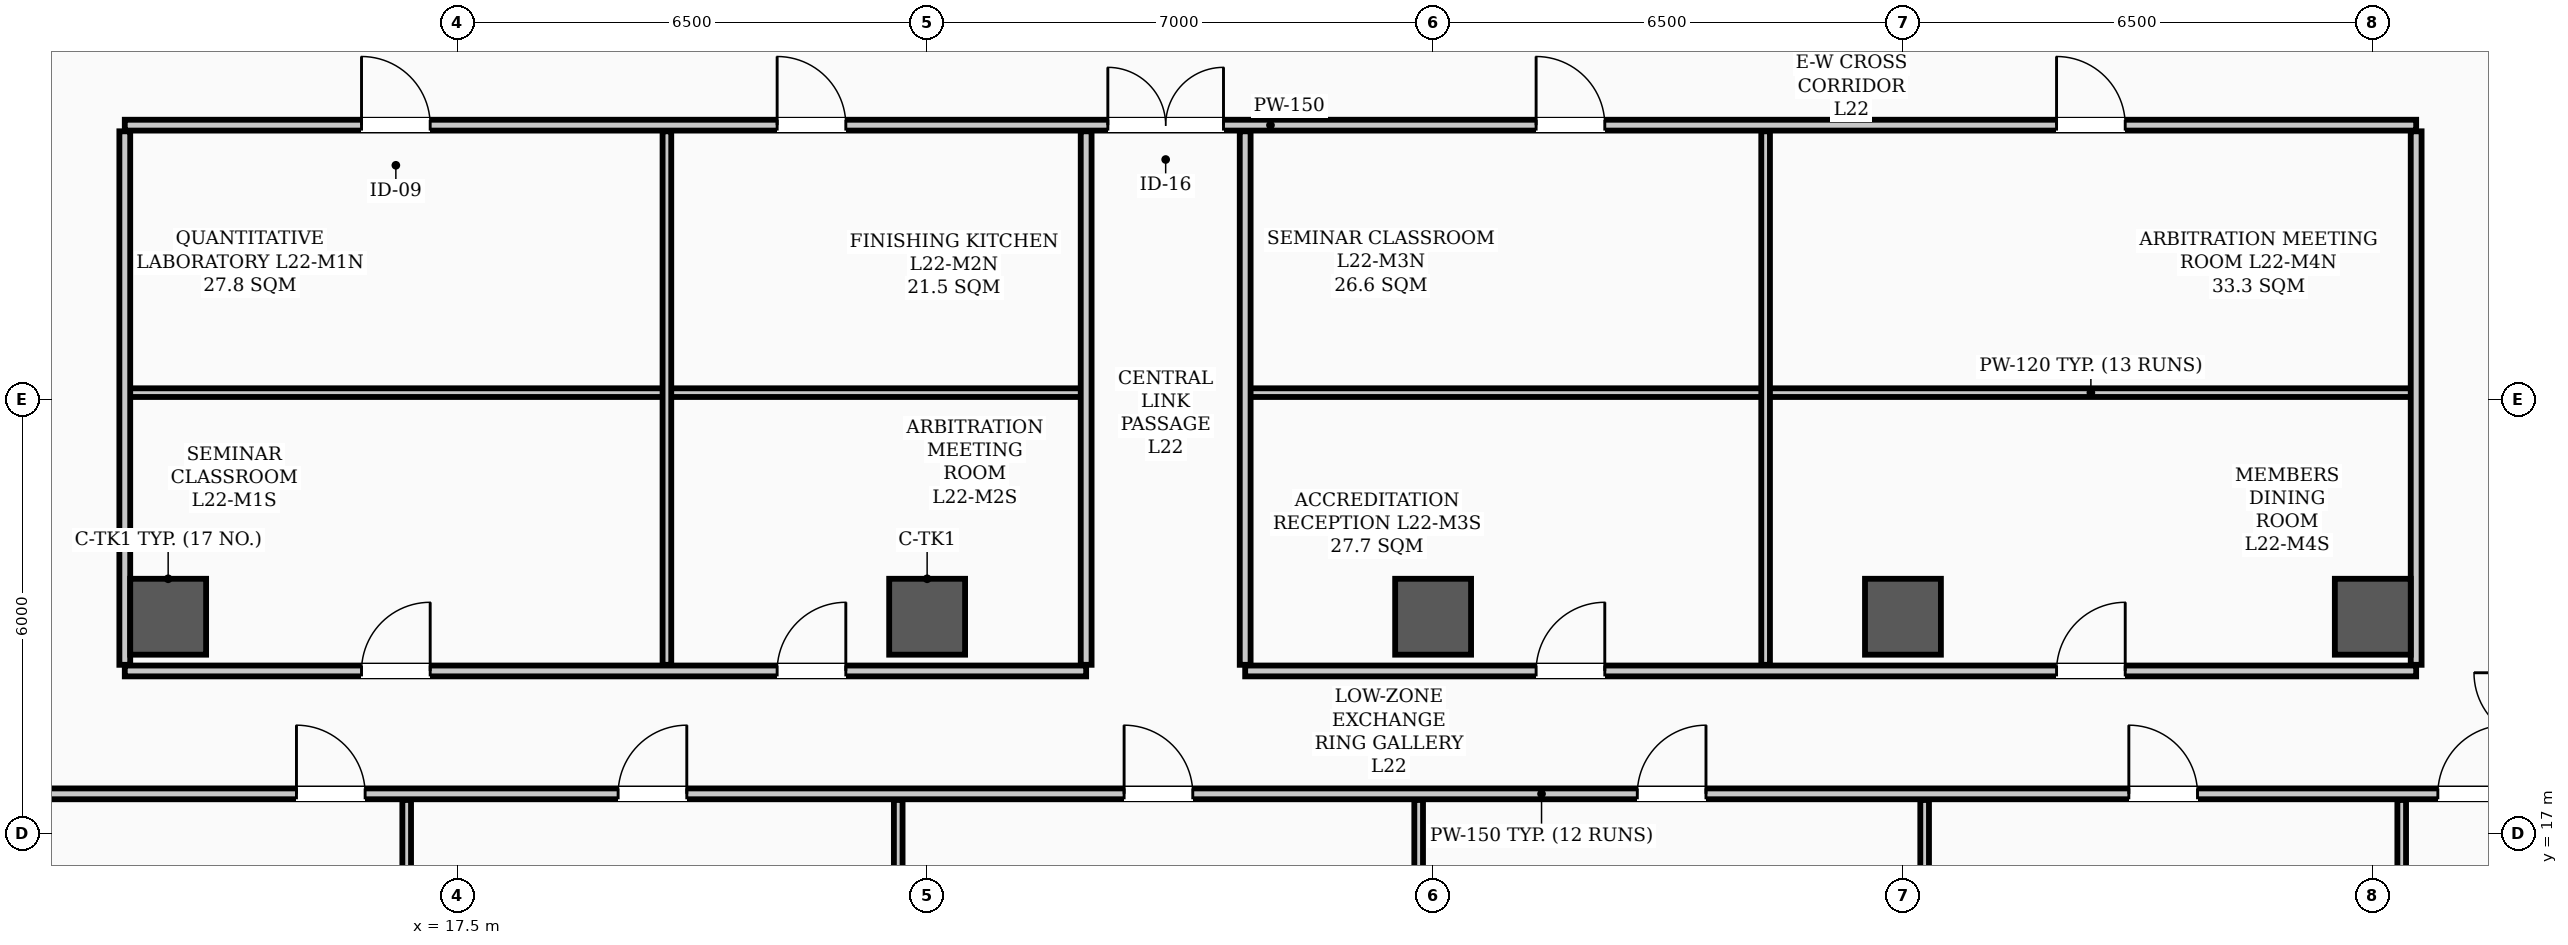
"""IFC4 building model, lengths in metres.
Left out: names, types, materials, properties, quantities, classifications, styles, units other than length and angle.
Written with IfcOpenShell. Run it as: python <this file> out.ifc"""

import sys

from ifc_helpers import new_model, si_unit, direction, frame, frame_2d, origin, origin_2d, place, context, subcontext, project, spatial, rectangle, hollow_rectangle, extrude, element, fill, save


model = new_model("IFC4")
c1 = context("Model", 3, precision=1e-05, world=origin(), true_north=direction((0.0, 1.0)))
c2 = subcontext(c1, "Body", "Model", "MODEL_VIEW")
j1 = project(units=[si_unit("LENGTHUNIT", "METRE"), si_unit("PLANEANGLEUNIT", "RADIAN")], contexts=[c1])
p1 = place(None, origin())
s1 = spatial("IfcSite", under=j1, at=p1, CompositionType="ELEMENT")
p2 = place(p1, origin())
s2 = spatial("IfcBuilding", under=s1, at=p2, CompositionType="ELEMENT")
p3 = place(p2, frame((0.0, 0.0, 88.9)))
s3 = spatial("IfcBuildingStorey", under=s2, at=p3, CompositionType="ELEMENT", Elevation=88.9)
for number, where, z_axis, x_axis in (
    (1, (13.5, 20.0, 0.0), (0.0, 0.0, 1.0), (1.0, 0.0, 0.0)),
    (2, (24.0, 20.0, 0.0), (0.0, 0.0, 1.0), (1.0, 0.0, 0.0)),
    (3, (31.0, 20.0, 0.0), (0.0, 0.0, 1.0), (1.0, 0.0, 0.0)),
    (4, (37.5, 20.0, 0.0), (0.0, 0.0, 1.0), (1.0, 0.0, 0.0)),
    (5, (44.0, 20.0, 0.0), (0.0, 0.0, 1.0), (1.0, 0.0, 0.0)),
):
    element("IfcColumn", number, at=place(p3, frame(where, z_axis=z_axis, x_axis=x_axis)), inside=s3, PredefinedType="COLUMN", context=c2, shape_type="SweptSolid", body=[
        extrude(hollow_rectangle(XDim=1.05, YDim=1.05, WallThickness=0.038, InnerFilletRadius=0.019, OuterFilletRadius=0.057, at=origin_2d()), origin(), (0.0, 0.0, 1.0), 3.9),
    ])
p4 = place(p3, frame((12.9, 26.8, 0.0), z_axis=(0.0, 0.0, 1.0), x_axis=(1.0, 0.0, 0.0)))
e6 = element("IfcWall", 6, at=p4, inside=s3, PredefinedType="PARTITIONING", context=c2, shape_type="SweptSolid", body=[
    extrude(rectangle(XDim=31.7, YDim=0.15, at=frame_2d((15.85, 0.0))), origin(), (0.0, 0.0, 1.0), 3.1),
])
p5 = place(p4, frame((13.6, 0.0, 0.0)))
e7 = element("IfcOpeningElement", 7, at=p5, cuts=e6, PredefinedType="OPENING", context=c2, shape_type="SweptSolid", body=[
    extrude(rectangle(XDim=1.6, YDim=2.08, at=frame_2d((0.8, 1.04))), frame((0.0, 0.085, 0.0), z_axis=(0.0, -1.0, 0.0), x_axis=(1.0, 0.0, 0.0)), (0.0, 0.0, 1.0), 0.17),
])
p6 = place(p4, frame((3.275, 0.0, 0.0)))
e8 = element("IfcOpeningElement", 8, at=p6, cuts=e6, PredefinedType="OPENING", context=c2, shape_type="SweptSolid", body=[
    extrude(rectangle(XDim=0.95, YDim=2.08, at=frame_2d((0.475, 1.04))), frame((0.0, 0.085, 0.0), z_axis=(0.0, -1.0, 0.0), x_axis=(1.0, 0.0, 0.0)), (0.0, 0.0, 1.0), 0.17),
])
p7 = place(p4, frame((9.025, 0.0, 0.0)))
e9 = element("IfcOpeningElement", 9, at=p7, cuts=e6, PredefinedType="OPENING", context=c2, shape_type="SweptSolid", body=[
    extrude(rectangle(XDim=0.95, YDim=2.08, at=frame_2d((0.475, 1.04))), frame((0.0, 0.085, 0.0), z_axis=(0.0, -1.0, 0.0), x_axis=(1.0, 0.0, 0.0)), (0.0, 0.0, 1.0), 0.17),
])
p8 = place(p4, frame((19.525, 0.0, 0.0)))
e10 = element("IfcOpeningElement", 10, at=p8, cuts=e6, PredefinedType="OPENING", context=c2, shape_type="SweptSolid", body=[
    extrude(rectangle(XDim=0.95, YDim=2.08, at=frame_2d((0.475, 1.04))), frame((0.0, 0.085, 0.0), z_axis=(0.0, -1.0, 0.0), x_axis=(1.0, 0.0, 0.0)), (0.0, 0.0, 1.0), 0.17),
])
p9 = place(p4, frame((26.725, 0.0, 0.0)))
e11 = element("IfcOpeningElement", 11, at=p9, cuts=e6, PredefinedType="OPENING", context=c2, shape_type="SweptSolid", body=[
    extrude(rectangle(XDim=0.95, YDim=2.08, at=frame_2d((0.475, 1.04))), frame((0.0, 0.085, 0.0), z_axis=(0.0, -1.0, 0.0), x_axis=(1.0, 0.0, 0.0)), (0.0, 0.0, 1.0), 0.17),
])
p10 = place(p3, frame((7.81, 17.55, 0.0), z_axis=(0.0, 0.0, 1.0), x_axis=(1.0, 0.0, 0.0)))
e12 = element("IfcWall", 12, at=p10, inside=s3, PredefinedType="PARTITIONING", context=c2, shape_type="SweptSolid", body=[
    extrude(rectangle(XDim=49.38, YDim=0.15, at=frame_2d((24.69, 0.0))), origin(), (0.0, 0.0, 1.0), 3.1),
])
p11 = place(p10, frame((7.465, 0.0, 0.0)))
e13 = element("IfcOpeningElement", 13, at=p11, cuts=e12, PredefinedType="OPENING", context=c2, shape_type="SweptSolid", body=[
    extrude(rectangle(XDim=0.95, YDim=2.08, at=frame_2d((0.475, 1.04))), frame((0.0, 0.085, 0.0), z_axis=(0.0, -1.0, 0.0), x_axis=(1.0, 0.0, 0.0)), (0.0, 0.0, 1.0), 0.17),
])
p12 = place(p10, frame((11.915, 0.0, 0.0)))
e14 = element("IfcOpeningElement", 14, at=p12, cuts=e12, PredefinedType="OPENING", context=c2, shape_type="SweptSolid", body=[
    extrude(rectangle(XDim=0.95, YDim=2.08, at=frame_2d((0.475, 1.04))), frame((0.0, 0.085, 0.0), z_axis=(0.0, -1.0, 0.0), x_axis=(1.0, 0.0, 0.0)), (0.0, 0.0, 1.0), 0.17),
])
p13 = place(p10, frame((18.915, 0.0, 0.0)))
e15 = element("IfcOpeningElement", 15, at=p13, cuts=e12, PredefinedType="OPENING", context=c2, shape_type="SweptSolid", body=[
    extrude(rectangle(XDim=0.95, YDim=2.08, at=frame_2d((0.475, 1.04))), frame((0.0, 0.085, 0.0), z_axis=(0.0, -1.0, 0.0), x_axis=(1.0, 0.0, 0.0)), (0.0, 0.0, 1.0), 0.17),
])
p14 = place(p10, frame((26.015, 0.0, 0.0)))
e16 = element("IfcOpeningElement", 16, at=p14, cuts=e12, PredefinedType="OPENING", context=c2, shape_type="SweptSolid", body=[
    extrude(rectangle(XDim=0.95, YDim=2.08, at=frame_2d((0.475, 1.04))), frame((0.0, 0.085, 0.0), z_axis=(0.0, -1.0, 0.0), x_axis=(1.0, 0.0, 0.0)), (0.0, 0.0, 1.0), 0.17),
])
p15 = place(p10, frame((32.815, 0.0, 0.0)))
e17 = element("IfcOpeningElement", 17, at=p15, cuts=e12, PredefinedType="OPENING", context=c2, shape_type="SweptSolid", body=[
    extrude(rectangle(XDim=0.95, YDim=2.08, at=frame_2d((0.475, 1.04))), frame((0.0, 0.085, 0.0), z_axis=(0.0, -1.0, 0.0), x_axis=(1.0, 0.0, 0.0)), (0.0, 0.0, 1.0), 0.17),
])
p16 = place(p10, frame((37.09, 0.0, 0.0)))
e18 = element("IfcOpeningElement", 18, at=p16, cuts=e12, PredefinedType="OPENING", context=c2, shape_type="SweptSolid", body=[
    extrude(rectangle(XDim=0.95, YDim=2.08, at=frame_2d((0.475, 1.04))), frame((0.0, 0.085, 0.0), z_axis=(0.0, -1.0, 0.0), x_axis=(1.0, 0.0, 0.0)), (0.0, 0.0, 1.0), 0.17),
])
p17 = place(p3, frame((12.9, 19.25, 0.0), z_axis=(0.0, 0.0, 1.0), x_axis=(1.0, 0.0, 0.0)))
e19 = element("IfcWall", 19, at=p17, inside=s3, PredefinedType="PARTITIONING", context=c2, shape_type="SweptSolid", body=[
    extrude(rectangle(XDim=13.3, YDim=0.15, at=frame_2d((6.65, 0.0))), origin(), (0.0, 0.0, 1.0), 3.1),
])
p18 = place(p17, frame((3.275, 0.0, 0.0)))
e20 = element("IfcOpeningElement", 20, at=p18, cuts=e19, PredefinedType="OPENING", context=c2, shape_type="SweptSolid", body=[
    extrude(rectangle(XDim=0.95, YDim=2.08, at=frame_2d((0.475, 1.04))), frame((0.0, 0.085, 0.0), z_axis=(0.0, -1.0, 0.0), x_axis=(1.0, 0.0, 0.0)), (0.0, 0.0, 1.0), 0.17),
])
p19 = place(p17, frame((9.025, 0.0, 0.0)))
e21 = element("IfcOpeningElement", 21, at=p19, cuts=e19, PredefinedType="OPENING", context=c2, shape_type="SweptSolid", body=[
    extrude(rectangle(XDim=0.95, YDim=2.08, at=frame_2d((0.475, 1.04))), frame((0.0, 0.085, 0.0), z_axis=(0.0, -1.0, 0.0), x_axis=(1.0, 0.0, 0.0)), (0.0, 0.0, 1.0), 0.17),
])
p20 = place(p3, frame((28.4, 19.25, 0.0), z_axis=(0.0, 0.0, 1.0), x_axis=(1.0, 0.0, 0.0)))
e22 = element("IfcWall", 22, at=p20, inside=s3, PredefinedType="PARTITIONING", context=c2, shape_type="SweptSolid", body=[
    extrude(rectangle(XDim=16.2, YDim=0.15, at=frame_2d((8.1, 0.0))), origin(), (0.0, 0.0, 1.0), 3.1),
])
p21 = place(p20, frame((4.025, 0.0, 0.0)))
e23 = element("IfcOpeningElement", 23, at=p21, cuts=e22, PredefinedType="OPENING", context=c2, shape_type="SweptSolid", body=[
    extrude(rectangle(XDim=0.95, YDim=2.08, at=frame_2d((0.475, 1.04))), frame((0.0, 0.085, 0.0), z_axis=(0.0, -1.0, 0.0), x_axis=(1.0, 0.0, 0.0)), (0.0, 0.0, 1.0), 0.17),
])
p22 = place(p20, frame((11.225, 0.0, 0.0)))
e24 = element("IfcOpeningElement", 24, at=p22, cuts=e22, PredefinedType="OPENING", context=c2, shape_type="SweptSolid", body=[
    extrude(rectangle(XDim=0.95, YDim=2.08, at=frame_2d((0.475, 1.04))), frame((0.0, 0.085, 0.0), z_axis=(0.0, -1.0, 0.0), x_axis=(1.0, 0.0, 0.0)), (0.0, 0.0, 1.0), 0.17),
])
p23 = place(p3, frame((12.9, 23.1, 0.0), z_axis=(0.0, 0.0, 1.0), x_axis=(1.0, 0.0, 0.0)))
e25 = element("IfcWall", 25, at=p23, inside=s3, PredefinedType="PARTITIONING", context=c2, shape_type="SweptSolid", body=[
    extrude(rectangle(XDim=7.5, YDim=0.12, at=frame_2d((3.75, 0.0))), origin(), (0.0, 0.0, 1.0), 3.1),
])
p24 = place(p3, frame((20.4, 23.1, 0.0), z_axis=(0.0, 0.0, 1.0), x_axis=(1.0, 0.0, 0.0)))
e26 = element("IfcWall", 26, at=p24, inside=s3, PredefinedType="PARTITIONING", context=c2, shape_type="SweptSolid", body=[
    extrude(rectangle(XDim=5.8, YDim=0.12, at=frame_2d((2.9, 0.0))), origin(), (0.0, 0.0, 1.0), 3.1),
])
p25 = place(p3, frame((28.4, 23.1, 0.0), z_axis=(0.0, 0.0, 1.0), x_axis=(1.0, 0.0, 0.0)))
e27 = element("IfcWall", 27, at=p25, inside=s3, PredefinedType="PARTITIONING", context=c2, shape_type="SweptSolid", body=[
    extrude(rectangle(XDim=7.2, YDim=0.12, at=frame_2d((3.6, 0.0))), origin(), (0.0, 0.0, 1.0), 3.1),
])
p26 = place(p3, frame((35.6, 23.1, 0.0), z_axis=(0.0, 0.0, 1.0), x_axis=(1.0, 0.0, 0.0)))
e28 = element("IfcWall", 28, at=p26, inside=s3, PredefinedType="PARTITIONING", context=c2, shape_type="SweptSolid", body=[
    extrude(rectangle(XDim=9.0, YDim=0.12, at=frame_2d((4.5, 0.0))), origin(), (0.0, 0.0, 1.0), 3.1),
])
for number, where, z_axis, x_axis in (
    (29, (26.2, 19.335, 0.0), (0.0, 0.0, 1.0), (0.0, 1.0, 0.0)),
    (30, (28.4, 19.335, 0.0), (0.0, 0.0, 1.0), (0.0, 1.0, 0.0)),
    (31, (12.9, 19.335, 0.0), (0.0, 0.0, 1.0), (0.0, 1.0, 0.0)),
    (32, (44.6, 19.335, 0.0), (0.0, 0.0, 1.0), (0.0, 1.0, 0.0)),
):
    element("IfcWall", number, at=place(p3, frame(where, z_axis=z_axis, x_axis=x_axis)), inside=s3, PredefinedType="PARTITIONING", context=c2, shape_type="SweptSolid", body=[
        extrude(rectangle(XDim=7.38, YDim=0.15, at=frame_2d((3.69, 0.0))), origin(), (0.0, 0.0, 1.0), 3.0),
    ])
p27 = place(p3, frame((16.8, 9.81, 0.0), z_axis=(0.0, 0.0, 1.0), x_axis=(0.0, 1.0, 0.0)))
e33 = element("IfcWall", 33, at=p27, inside=s3, PredefinedType="PARTITIONING", context=c2, shape_type="SweptSolid", body=[
    extrude(rectangle(XDim=7.655, YDim=0.12, at=frame_2d((3.828, 0.0))), origin(), (0.0, 0.0, 1.0), 3.212),
])
p28 = place(p3, frame((23.6, 11.57, 0.0), z_axis=(0.0, 0.0, 1.0), x_axis=(0.0, 1.0, 0.0)))
e34 = element("IfcWall", 34, at=p28, inside=s3, PredefinedType="PARTITIONING", context=c2, shape_type="SweptSolid", body=[
    extrude(rectangle(XDim=5.895, YDim=0.12, at=frame_2d((2.948, 0.0))), origin(), (0.0, 0.0, 1.0), 3.1),
])
for number, where, z_axis, x_axis in (
    (35, (30.8, 9.81, 0.0), (0.0, 0.0, 1.0), (0.0, 1.0, 0.0)),
    (36, (37.8, 9.81, 0.0), (0.0, 0.0, 1.0), (0.0, 1.0, 0.0)),
    (37, (44.4, 9.81, 0.0), (0.0, 0.0, 1.0), (0.0, 1.0, 0.0)),
):
    element("IfcWall", number, at=place(p3, frame(where, z_axis=z_axis, x_axis=x_axis)), inside=s3, PredefinedType="PARTITIONING", context=c2, shape_type="SweptSolid", body=[
        extrude(rectangle(XDim=7.655, YDim=0.12, at=frame_2d((3.828, 0.0))), origin(), (0.0, 0.0, 1.0), 3.1),
    ])
for number, where, z_axis, x_axis in (
    (38, (20.4, 19.335, 0.0), (0.0, 0.0, 1.0), (0.0, 1.0, 0.0)),
    (39, (35.6, 19.335, 0.0), (0.0, 0.0, 1.0), (0.0, 1.0, 0.0)),
):
    element("IfcWall", number, at=place(p3, frame(where, z_axis=z_axis, x_axis=x_axis)), inside=s3, PredefinedType="PARTITIONING", context=c2, shape_type="SweptSolid", body=[
        extrude(rectangle(XDim=7.38, YDim=0.12, at=frame_2d((3.69, 0.0))), origin(), (0.0, 0.0, 1.0), 3.0),
    ])
p29 = place(p5, origin())
e40 = element("IfcDoor", 40, at=p29, inside=s3, OperationType="DOUBLE_DOOR_SINGLE_SWING", PredefinedType="DOOR", context=c2, shape_type="SweptSolid", body=[
    extrude(rectangle(XDim=1.6, YDim=2.08, at=frame_2d((0.8, 1.04))), frame((0.0, 0.025, 0.0), z_axis=(0.0, -1.0, 0.0), x_axis=(1.0, 0.0, 0.0)), (0.0, 0.0, 1.0), 0.05),
])
fill(e7, e40)
p30 = place(p11, origin())
e41 = element("IfcDoor", 41, at=p30, inside=s3, OperationType="SINGLE_SWING_LEFT", PredefinedType="DOOR", context=c2, shape_type="SweptSolid", body=[
    extrude(rectangle(XDim=0.95, YDim=2.08, at=frame_2d((0.475, 1.04))), frame((0.0, 0.025, 0.0), z_axis=(0.0, -1.0, 0.0), x_axis=(1.0, 0.0, 0.0)), (0.0, 0.0, 1.0), 0.05),
])
fill(e13, e41)
p31 = place(p12, origin())
e42 = element("IfcDoor", 42, at=p31, inside=s3, OperationType="SINGLE_SWING_RIGHT", PredefinedType="DOOR", context=c2, shape_type="SweptSolid", body=[
    extrude(rectangle(XDim=0.95, YDim=2.08, at=frame_2d((0.475, 1.04))), frame((0.0, 0.025, 0.0), z_axis=(0.0, -1.0, 0.0), x_axis=(1.0, 0.0, 0.0)), (0.0, 0.0, 1.0), 0.05),
])
fill(e14, e42)
p32 = place(p13, origin())
e43 = element("IfcDoor", 43, at=p32, inside=s3, OperationType="SINGLE_SWING_LEFT", PredefinedType="DOOR", context=c2, shape_type="SweptSolid", body=[
    extrude(rectangle(XDim=0.95, YDim=2.08, at=frame_2d((0.475, 1.04))), frame((0.0, 0.025, 0.0), z_axis=(0.0, -1.0, 0.0), x_axis=(1.0, 0.0, 0.0)), (0.0, 0.0, 1.0), 0.05),
])
fill(e15, e43)
p33 = place(p14, origin())
e44 = element("IfcDoor", 44, at=p33, inside=s3, OperationType="SINGLE_SWING_RIGHT", PredefinedType="DOOR", context=c2, shape_type="SweptSolid", body=[
    extrude(rectangle(XDim=0.95, YDim=2.08, at=frame_2d((0.475, 1.04))), frame((0.0, 0.025, 0.0), z_axis=(0.0, -1.0, 0.0), x_axis=(1.0, 0.0, 0.0)), (0.0, 0.0, 1.0), 0.05),
])
fill(e16, e44)
p34 = place(p15, origin())
e45 = element("IfcDoor", 45, at=p34, inside=s3, OperationType="SINGLE_SWING_LEFT", PredefinedType="DOOR", context=c2, shape_type="SweptSolid", body=[
    extrude(rectangle(XDim=0.95, YDim=2.08, at=frame_2d((0.475, 1.04))), frame((0.0, 0.025, 0.0), z_axis=(0.0, -1.0, 0.0), x_axis=(1.0, 0.0, 0.0)), (0.0, 0.0, 1.0), 0.05),
])
fill(e17, e45)
p35 = place(p16, origin())
e46 = element("IfcDoor", 46, at=p35, inside=s3, OperationType="SINGLE_SWING_RIGHT", PredefinedType="DOOR", context=c2, shape_type="SweptSolid", body=[
    extrude(rectangle(XDim=0.95, YDim=2.08, at=frame_2d((0.475, 1.04))), frame((0.0, 0.025, 0.0), z_axis=(0.0, -1.0, 0.0), x_axis=(1.0, 0.0, 0.0)), (0.0, 0.0, 1.0), 0.05),
])
fill(e18, e46)
p36 = place(p6, origin())
e47 = element("IfcDoor", 47, at=p36, inside=s3, OperationType="SINGLE_SWING_LEFT", PredefinedType="DOOR", context=c2, shape_type="SweptSolid", body=[
    extrude(rectangle(XDim=0.95, YDim=2.08, at=frame_2d((0.475, 1.04))), frame((0.0, 0.025, 0.0), z_axis=(0.0, -1.0, 0.0), x_axis=(1.0, 0.0, 0.0)), (0.0, 0.0, 1.0), 0.05),
])
fill(e8, e47)
p37 = place(p18, origin())
e48 = element("IfcDoor", 48, at=p37, inside=s3, OperationType="SINGLE_SWING_RIGHT", PredefinedType="DOOR", context=c2, shape_type="SweptSolid", body=[
    extrude(rectangle(XDim=0.95, YDim=2.08, at=frame_2d((0.475, 1.04))), frame((0.0, 0.025, 0.0), z_axis=(0.0, -1.0, 0.0), x_axis=(1.0, 0.0, 0.0)), (0.0, 0.0, 1.0), 0.05),
])
fill(e20, e48)
p38 = place(p7, origin())
e49 = element("IfcDoor", 49, at=p38, inside=s3, OperationType="SINGLE_SWING_LEFT", PredefinedType="DOOR", context=c2, shape_type="SweptSolid", body=[
    extrude(rectangle(XDim=0.95, YDim=2.08, at=frame_2d((0.475, 1.04))), frame((0.0, 0.025, 0.0), z_axis=(0.0, -1.0, 0.0), x_axis=(1.0, 0.0, 0.0)), (0.0, 0.0, 1.0), 0.05),
])
fill(e9, e49)
p39 = place(p19, origin())
e50 = element("IfcDoor", 50, at=p39, inside=s3, OperationType="SINGLE_SWING_RIGHT", PredefinedType="DOOR", context=c2, shape_type="SweptSolid", body=[
    extrude(rectangle(XDim=0.95, YDim=2.08, at=frame_2d((0.475, 1.04))), frame((0.0, 0.025, 0.0), z_axis=(0.0, -1.0, 0.0), x_axis=(1.0, 0.0, 0.0)), (0.0, 0.0, 1.0), 0.05),
])
fill(e21, e50)
p40 = place(p8, origin())
e51 = element("IfcDoor", 51, at=p40, inside=s3, OperationType="SINGLE_SWING_LEFT", PredefinedType="DOOR", context=c2, shape_type="SweptSolid", body=[
    extrude(rectangle(XDim=0.95, YDim=2.08, at=frame_2d((0.475, 1.04))), frame((0.0, 0.025, 0.0), z_axis=(0.0, -1.0, 0.0), x_axis=(1.0, 0.0, 0.0)), (0.0, 0.0, 1.0), 0.05),
])
fill(e10, e51)
p41 = place(p21, origin())
e52 = element("IfcDoor", 52, at=p41, inside=s3, OperationType="SINGLE_SWING_RIGHT", PredefinedType="DOOR", context=c2, shape_type="SweptSolid", body=[
    extrude(rectangle(XDim=0.95, YDim=2.08, at=frame_2d((0.475, 1.04))), frame((0.0, 0.025, 0.0), z_axis=(0.0, -1.0, 0.0), x_axis=(1.0, 0.0, 0.0)), (0.0, 0.0, 1.0), 0.05),
])
fill(e23, e52)
p42 = place(p9, origin())
e53 = element("IfcDoor", 53, at=p42, inside=s3, OperationType="SINGLE_SWING_LEFT", PredefinedType="DOOR", context=c2, shape_type="SweptSolid", body=[
    extrude(rectangle(XDim=0.95, YDim=2.08, at=frame_2d((0.475, 1.04))), frame((0.0, 0.025, 0.0), z_axis=(0.0, -1.0, 0.0), x_axis=(1.0, 0.0, 0.0)), (0.0, 0.0, 1.0), 0.05),
])
fill(e11, e53)
p43 = place(p22, origin())
e54 = element("IfcDoor", 54, at=p43, inside=s3, OperationType="SINGLE_SWING_RIGHT", PredefinedType="DOOR", context=c2, shape_type="SweptSolid", body=[
    extrude(rectangle(XDim=0.95, YDim=2.08, at=frame_2d((0.475, 1.04))), frame((0.0, 0.025, 0.0), z_axis=(0.0, -1.0, 0.0), x_axis=(1.0, 0.0, 0.0)), (0.0, 0.0, 1.0), 0.05),
])
fill(e24, e54)
save(model, sys.argv[1])
